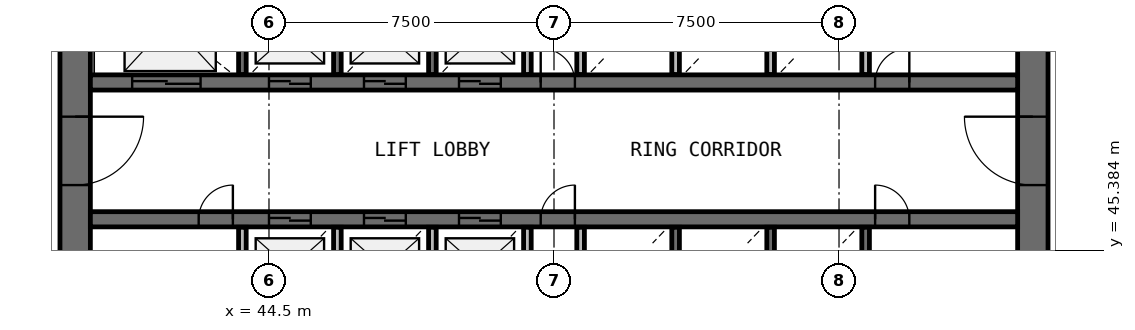
"""IFC4 building model, lengths in metres.
Left out: names, types, materials, properties, quantities, classifications, styles, units other than length and angle.
Written with IfcOpenShell. Run it as: python <this file> out.ifc"""

import sys

from ifc_helpers import new_model, si_unit, direction, frame, frame_2d, origin, place, context, subcontext, project, spatial, rectangle, extrude, source, transform, mapped, element, fill, save


model = new_model("IFC4")
c1 = context("Model", 3, precision=1e-05, world=origin(), true_north=direction((0.0, 1.0)))
c2 = subcontext(c1, "Body", "Model", "MODEL_VIEW")
j1 = project(units=[si_unit("LENGTHUNIT", "METRE"), si_unit("PLANEANGLEUNIT", "RADIAN")], contexts=[c1])
p1 = place(None, origin())
s1 = spatial("IfcSite", under=j1, at=p1, CompositionType="ELEMENT")
p2 = place(p1, origin())
s2 = spatial("IfcBuilding", under=s1, at=p2, CompositionType="ELEMENT")
p3 = place(p2, frame((0.0, 0.0, 100.3)))
s3 = spatial("IfcBuildingStorey", under=s2, at=p3, CompositionType="ELEMENT", Elevation=100.3)
p4 = place(p3, frame((64.6, 38.0, 0.0), z_axis=(0.0, 0.0, 1.0), x_axis=(0.0, 1.0, 0.0)))
e1 = element("IfcWall", 1, at=p4, inside=s3, PredefinedType="SHEAR", context=c2, shape_type="SweptSolid", body=[
    extrude(rectangle(XDim=20.0, YDim=0.8, at=frame_2d((10.0, 0.0))), origin(), (0.0, 0.0, 1.0), 4.1),
])
p5 = place(p4, frame((9.1, 0.0, 0.0)))
e2 = element("IfcOpeningElement", 2, at=p5, cuts=e1, PredefinedType="OPENING", context=c2, shape_type="SweptSolid", body=[
    extrude(rectangle(XDim=1.8, YDim=2.1, at=frame_2d((0.9, 1.05))), frame((0.0, 0.41, 0.0), z_axis=(0.0, -1.0, 0.0), x_axis=(1.0, 0.0, 0.0)), (0.0, 0.0, 1.0), 0.82),
])
p6 = place(p3, frame((39.4, 58.0, 0.0), z_axis=(0.0, 0.0, 1.0), x_axis=(0.0, -1.0, 0.0)))
e3 = element("IfcWall", 3, at=p6, inside=s3, PredefinedType="SHEAR", context=c2, shape_type="SweptSolid", body=[
    extrude(rectangle(XDim=20.0, YDim=0.8, at=frame_2d((10.0, 0.0))), origin(), (0.0, 0.0, 1.0), 4.1),
])
p7 = place(p6, frame((9.1, 0.0, 0.0)))
e4 = element("IfcOpeningElement", 4, at=p7, cuts=e3, PredefinedType="OPENING", context=c2, shape_type="SweptSolid", body=[
    extrude(rectangle(XDim=1.8, YDim=2.1, at=frame_2d((0.9, 1.05))), frame((0.0, 0.41, 0.0), z_axis=(0.0, -1.0, 0.0), x_axis=(1.0, 0.0, 0.0)), (0.0, 0.0, 1.0), 0.82),
])
p8 = place(p3, frame((39.8, 49.8, 0.0), z_axis=(0.0, 0.0, 1.0), x_axis=(1.0, 0.0, 0.0)))
e5 = element("IfcWall", 5, at=p8, inside=s3, PredefinedType="SHEAR", context=c2, shape_type="SweptSolid", body=[
    extrude(rectangle(XDim=24.4, YDim=0.4, at=frame_2d((12.2, 0.0))), origin(), (0.0, 0.0, 1.0), 4.1),
])
p9 = place(p8, frame((4.7, 0.0, 0.0)))
e6 = element("IfcOpeningElement", 6, at=p9, cuts=e5, PredefinedType="OPENING", context=c2, shape_type="SweptSolid", body=[
    extrude(rectangle(XDim=1.1, YDim=2.1, at=frame_2d((0.55, 1.05))), frame((0.0, 0.21, 0.0), z_axis=(0.0, -1.0, 0.0), x_axis=(1.0, 0.0, 0.0)), (0.0, 0.0, 1.0), 0.42),
])
p10 = place(p8, frame((7.2, 0.0, 0.0)))
e7 = element("IfcOpeningElement", 7, at=p10, cuts=e5, PredefinedType="OPENING", context=c2, shape_type="SweptSolid", body=[
    extrude(rectangle(XDim=1.1, YDim=2.1, at=frame_2d((0.55, 1.05))), frame((0.0, 0.21, 0.0), z_axis=(0.0, -1.0, 0.0), x_axis=(1.0, 0.0, 0.0)), (0.0, 0.0, 1.0), 0.42),
])
p11 = place(p8, frame((9.7, 0.0, 0.0)))
e8 = element("IfcOpeningElement", 8, at=p11, cuts=e5, PredefinedType="OPENING", context=c2, shape_type="SweptSolid", body=[
    extrude(rectangle(XDim=1.1, YDim=2.1, at=frame_2d((0.55, 1.05))), frame((0.0, 0.21, 0.0), z_axis=(0.0, -1.0, 0.0), x_axis=(1.0, 0.0, 0.0)), (0.0, 0.0, 1.0), 0.42),
])
p12 = place(p8, frame((1.1, 0.0, 0.0)))
e9 = element("IfcOpeningElement", 9, at=p12, cuts=e5, PredefinedType="OPENING", context=c2, shape_type="SweptSolid", body=[
    extrude(rectangle(XDim=1.8, YDim=2.4, at=frame_2d((0.9, 1.2))), frame((0.0, 0.21, 0.0), z_axis=(0.0, -1.0, 0.0), x_axis=(1.0, 0.0, 0.0)), (0.0, 0.0, 1.0), 0.42),
])
p13 = place(p8, frame((20.65, 0.0, 0.0)))
e10 = element("IfcOpeningElement", 10, at=p13, cuts=e5, PredefinedType="OPENING", context=c2, shape_type="SweptSolid", body=[
    extrude(rectangle(XDim=0.9, YDim=2.1, at=frame_2d((0.45, 1.05))), frame((0.0, 0.21, 0.0), z_axis=(0.0, -1.0, 0.0), x_axis=(1.0, 0.0, 0.0)), (0.0, 0.0, 1.0), 0.42),
])
p14 = place(p8, frame((11.85, 0.0, 0.0)))
e11 = element("IfcOpeningElement", 11, at=p14, cuts=e5, PredefinedType="OPENING", context=c2, shape_type="SweptSolid", body=[
    extrude(rectangle(XDim=0.9, YDim=2.1, at=frame_2d((0.45, 1.05))), frame((0.0, 0.21, 0.0), z_axis=(0.0, -1.0, 0.0), x_axis=(1.0, 0.0, 0.0)), (0.0, 0.0, 1.0), 0.42),
])
p15 = place(p3, frame((39.8, 46.2, 0.0), z_axis=(0.0, 0.0, 1.0), x_axis=(1.0, 0.0, 0.0)))
e12 = element("IfcWall", 12, at=p15, inside=s3, PredefinedType="SHEAR", context=c2, shape_type="SweptSolid", body=[
    extrude(rectangle(XDim=24.4, YDim=0.4, at=frame_2d((12.2, 0.0))), origin(), (0.0, 0.0, 1.0), 4.1),
])
p16 = place(p15, frame((4.7, 0.0, 0.0)))
e13 = element("IfcOpeningElement", 13, at=p16, cuts=e12, PredefinedType="OPENING", context=c2, shape_type="SweptSolid", body=[
    extrude(rectangle(XDim=1.1, YDim=2.1, at=frame_2d((0.55, 1.05))), frame((0.0, 0.21, 0.0), z_axis=(0.0, -1.0, 0.0), x_axis=(1.0, 0.0, 0.0)), (0.0, 0.0, 1.0), 0.42),
])
p17 = place(p15, frame((7.2, 0.0, 0.0)))
e14 = element("IfcOpeningElement", 14, at=p17, cuts=e12, PredefinedType="OPENING", context=c2, shape_type="SweptSolid", body=[
    extrude(rectangle(XDim=1.1, YDim=2.1, at=frame_2d((0.55, 1.05))), frame((0.0, 0.21, 0.0), z_axis=(0.0, -1.0, 0.0), x_axis=(1.0, 0.0, 0.0)), (0.0, 0.0, 1.0), 0.42),
])
p18 = place(p15, frame((9.7, 0.0, 0.0)))
e15 = element("IfcOpeningElement", 15, at=p18, cuts=e12, PredefinedType="OPENING", context=c2, shape_type="SweptSolid", body=[
    extrude(rectangle(XDim=1.1, YDim=2.1, at=frame_2d((0.55, 1.05))), frame((0.0, 0.21, 0.0), z_axis=(0.0, -1.0, 0.0), x_axis=(1.0, 0.0, 0.0)), (0.0, 0.0, 1.0), 0.42),
])
p19 = place(p15, frame((20.65, 0.0, 0.0)))
e16 = element("IfcOpeningElement", 16, at=p19, cuts=e12, PredefinedType="OPENING", context=c2, shape_type="SweptSolid", body=[
    extrude(rectangle(XDim=0.9, YDim=2.1, at=frame_2d((0.45, 1.05))), frame((0.0, 0.21, 0.0), z_axis=(0.0, -1.0, 0.0), x_axis=(1.0, 0.0, 0.0)), (0.0, 0.0, 1.0), 0.42),
])
p20 = place(p15, frame((2.85, 0.0, 0.0)))
e17 = element("IfcOpeningElement", 17, at=p20, cuts=e12, PredefinedType="OPENING", context=c2, shape_type="SweptSolid", body=[
    extrude(rectangle(XDim=0.9, YDim=2.1, at=frame_2d((0.45, 1.05))), frame((0.0, 0.21, 0.0), z_axis=(0.0, -1.0, 0.0), x_axis=(1.0, 0.0, 0.0)), (0.0, 0.0, 1.0), 0.42),
])
p21 = place(p15, frame((11.85, 0.0, 0.0)))
e18 = element("IfcOpeningElement", 18, at=p21, cuts=e12, PredefinedType="OPENING", context=c2, shape_type="SweptSolid", body=[
    extrude(rectangle(XDim=0.9, YDim=2.1, at=frame_2d((0.45, 1.05))), frame((0.0, 0.21, 0.0), z_axis=(0.0, -1.0, 0.0), x_axis=(1.0, 0.0, 0.0)), (0.0, 0.0, 1.0), 0.42),
])
for number, where, z_axis, x_axis in (
    (19, (43.8, 45.99, 0.0), (0.0, 0.0, 1.0), (0.0, -1.0, 0.0)),
    (20, (43.8, 52.37, 0.0), (0.0, 0.0, 1.0), (0.0, -1.0, 0.0)),
):
    element("IfcWall", number, at=place(p3, frame(where, z_axis=z_axis, x_axis=x_axis)), inside=s3, PredefinedType="SOLIDWALL", context=c2, shape_type="SweptSolid", body=[
        extrude(rectangle(XDim=2.36, YDim=0.2, at=frame_2d((1.18, 0.0))), origin(), (0.0, 0.0, 1.0), 3.7),
    ])
p22 = place(p3, frame((46.3, 43.6, 0.0), z_axis=(0.0, 0.0, 1.0), x_axis=(0.0, 1.0, 0.0)))
e21 = element("IfcWall", 21, at=p22, inside=s3, PredefinedType="SOLIDWALL", context=c2, shape_type="SweptSolid", body=[
    extrude(rectangle(XDim=2.39, YDim=0.2, at=frame_2d((1.195, 0.0))), origin(), (0.0, 0.0, 1.0), 3.7),
])
for number, where, z_axis, x_axis in (
    (22, (46.3, 50.01, 0.0), (0.0, 0.0, 1.0), (0.0, 1.0, 0.0)),
    (23, (48.8, 43.63, 0.0), (0.0, 0.0, 1.0), (0.0, 1.0, 0.0)),
    (24, (48.8, 50.01, 0.0), (0.0, 0.0, 1.0), (0.0, 1.0, 0.0)),
    (25, (51.3, 43.63, 0.0), (0.0, 0.0, 1.0), (0.0, 1.0, 0.0)),
):
    element("IfcWall", number, at=place(p3, frame(where, z_axis=z_axis, x_axis=x_axis)), inside=s3, PredefinedType="SOLIDWALL", context=c2, shape_type="SweptSolid", body=[
        extrude(rectangle(XDim=2.36, YDim=0.2, at=frame_2d((1.18, 0.0))), origin(), (0.0, 0.0, 1.0), 3.7),
    ])
for number, where, z_axis, x_axis in (
    (26, (51.3, 50.01, 0.0), (0.0, 0.0, 1.0), (0.0, 1.0, 0.0)),
    (27, (52.7, 45.99, 0.0), (0.0, 0.0, 1.0), (0.0, -1.0, 0.0)),
):
    element("IfcWall", number, at=place(p3, frame(where, z_axis=z_axis, x_axis=x_axis)), inside=s3, PredefinedType="SOLIDWALL", context=c2, shape_type="SweptSolid", body=[
        extrude(rectangle(XDim=2.39, YDim=0.2, at=frame_2d((1.195, 0.0))), origin(), (0.0, 0.0, 1.0), 3.7),
    ])
for number, where, z_axis, x_axis in (
    (28, (52.7, 52.37, 0.0), (0.0, 0.0, 1.0), (0.0, -1.0, 0.0)),
    (29, (55.2, 43.63, 0.0), (0.0, 0.0, 1.0), (0.0, 1.0, 0.0)),
    (30, (55.2, 50.01, 0.0), (0.0, 0.0, 1.0), (0.0, 1.0, 0.0)),
    (31, (57.7, 43.63, 0.0), (0.0, 0.0, 1.0), (0.0, 1.0, 0.0)),
):
    element("IfcWall", number, at=place(p3, frame(where, z_axis=z_axis, x_axis=x_axis)), inside=s3, PredefinedType="SOLIDWALL", context=c2, shape_type="SweptSolid", body=[
        extrude(rectangle(XDim=2.36, YDim=0.2, at=frame_2d((1.18, 0.0))), origin(), (0.0, 0.0, 1.0), 3.7),
    ])
p23 = place(p3, frame((57.7, 50.01, 0.0), z_axis=(0.0, 0.0, 1.0), x_axis=(0.0, 1.0, 0.0)))
e32 = element("IfcWall", 32, at=p23, inside=s3, PredefinedType="SOLIDWALL", context=c2, shape_type="SweptSolid", body=[
    extrude(rectangle(XDim=2.39, YDim=0.2, at=frame_2d((1.195, 0.0))), origin(), (0.0, 0.0, 1.0), 3.7),
])
for number, where, z_axis, x_axis in (
    (33, (60.2, 43.63, 0.0), (0.0, 0.0, 1.0), (0.0, 1.0, 0.0)),
    (34, (60.2, 50.01, 0.0), (0.0, 0.0, 1.0), (0.0, 1.0, 0.0)),
):
    element("IfcWall", number, at=place(p3, frame(where, z_axis=z_axis, x_axis=x_axis)), inside=s3, PredefinedType="SOLIDWALL", context=c2, shape_type="SweptSolid", body=[
        extrude(rectangle(XDim=2.36, YDim=0.2, at=frame_2d((1.18, 0.0))), origin(), (0.0, 0.0, 1.0), 3.7),
    ])
m1 = source(origin(), c2, "Body", "SweptSolid", [
    extrude(rectangle(XDim=1.8, YDim=2.1, at=frame_2d((0.9, 1.05))), frame((0.0, 0.025, 0.0), z_axis=(0.0, -1.0, 0.0), x_axis=(1.0, 0.0, 0.0)), (0.0, 0.0, 1.0), 0.05),
])
p24 = place(p7, origin())
e35 = element("IfcDoor", 35, at=p24, inside=s3, OperationType="SINGLE_SWING_LEFT", PredefinedType="DOOR", context=c2, shape_type="MappedRepresentation", body=[
    mapped(m1, transform((0.0, 0.0, 0.0), scale=1.0)),
])
fill(e4, e35)
p25 = place(p5, origin())
e36 = element("IfcDoor", 36, at=p25, inside=s3, OperationType="SINGLE_SWING_RIGHT", PredefinedType="DOOR", context=c2, shape_type="MappedRepresentation", body=[
    mapped(m1, transform((0.0, 0.0, 0.0), scale=1.0)),
])
fill(e2, e36)
m2 = source(origin(), c2, "Body", "SweptSolid", [
    extrude(rectangle(XDim=1.1, YDim=2.1, at=frame_2d((0.55, 1.05))), frame((0.0, 0.025, 0.0), z_axis=(0.0, -1.0, 0.0), x_axis=(1.0, 0.0, 0.0)), (0.0, 0.0, 1.0), 0.05),
])
p26 = place(p9, origin())
e37 = element("IfcDoor", 37, at=p26, inside=s3, OperationType="DOUBLE_DOOR_SLIDING", PredefinedType="USERDEFINED", context=c2, shape_type="MappedRepresentation", body=[
    mapped(m2, transform((0.0, 0.0, 0.0), scale=1.0)),
])
fill(e6, e37)
p27 = place(p10, origin())
e38 = element("IfcDoor", 38, at=p27, inside=s3, OperationType="DOUBLE_DOOR_SLIDING", PredefinedType="USERDEFINED", context=c2, shape_type="MappedRepresentation", body=[
    mapped(m2, transform((0.0, 0.0, 0.0), scale=1.0)),
])
fill(e7, e38)
p28 = place(p11, origin())
e39 = element("IfcDoor", 39, at=p28, inside=s3, OperationType="DOUBLE_DOOR_SLIDING", PredefinedType="USERDEFINED", context=c2, shape_type="MappedRepresentation", body=[
    mapped(m2, transform((0.0, 0.0, 0.0), scale=1.0)),
])
fill(e8, e39)
p29 = place(p16, origin())
e40 = element("IfcDoor", 40, at=p29, inside=s3, OperationType="DOUBLE_DOOR_SLIDING", PredefinedType="USERDEFINED", context=c2, shape_type="MappedRepresentation", body=[
    mapped(m2, transform((0.0, 0.0, 0.0), scale=1.0)),
])
fill(e13, e40)
p30 = place(p17, origin())
e41 = element("IfcDoor", 41, at=p30, inside=s3, OperationType="DOUBLE_DOOR_SLIDING", PredefinedType="USERDEFINED", context=c2, shape_type="MappedRepresentation", body=[
    mapped(m2, transform((0.0, 0.0, 0.0), scale=1.0)),
])
fill(e14, e41)
p31 = place(p18, origin())
e42 = element("IfcDoor", 42, at=p31, inside=s3, OperationType="DOUBLE_DOOR_SLIDING", PredefinedType="USERDEFINED", context=c2, shape_type="MappedRepresentation", body=[
    mapped(m2, transform((0.0, 0.0, 0.0), scale=1.0)),
])
fill(e15, e42)
m3 = source(origin(), c2, "Body", "SweptSolid", [
    extrude(rectangle(XDim=1.8, YDim=2.4, at=frame_2d((0.9, 1.2))), frame((0.0, 0.025, 0.0), z_axis=(0.0, -1.0, 0.0), x_axis=(1.0, 0.0, 0.0)), (0.0, 0.0, 1.0), 0.05),
])
p32 = place(p12, origin())
e43 = element("IfcDoor", 43, at=p32, inside=s3, OperationType="DOUBLE_DOOR_SLIDING", PredefinedType="USERDEFINED", context=c2, shape_type="MappedRepresentation", body=[
    mapped(m3, transform((0.0, 0.0, 0.0), scale=1.0)),
])
fill(e9, e43)
m4 = source(origin(), c2, "Body", "SweptSolid", [
    extrude(rectangle(XDim=0.9, YDim=2.1, at=frame_2d((0.45, 1.05))), frame((0.0, 0.025, 0.0), z_axis=(0.0, -1.0, 0.0), x_axis=(1.0, 0.0, 0.0)), (0.0, 0.0, 1.0), 0.05),
])
p33 = place(p19, origin())
e44 = element("IfcDoor", 44, at=p33, inside=s3, OperationType="SINGLE_SWING_LEFT", PredefinedType="DOOR", context=c2, shape_type="MappedRepresentation", body=[
    mapped(m4, transform((0.0, 0.0, 0.0), scale=1.0)),
])
fill(e16, e44)
p34 = place(p13, origin())
e45 = element("IfcDoor", 45, at=p34, inside=s3, OperationType="SINGLE_SWING_RIGHT", PredefinedType="DOOR", context=c2, shape_type="MappedRepresentation", body=[
    mapped(m4, transform((0.0, 0.0, 0.0), scale=1.0)),
])
fill(e10, e45)
p35 = place(p20, origin())
e46 = element("IfcDoor", 46, at=p35, inside=s3, OperationType="SINGLE_SWING_RIGHT", PredefinedType="DOOR", context=c2, shape_type="MappedRepresentation", body=[
    mapped(m4, transform((0.0, 0.0, 0.0), scale=1.0)),
])
fill(e17, e46)
p36 = place(p14, origin())
e47 = element("IfcDoor", 47, at=p36, inside=s3, OperationType="SINGLE_SWING_LEFT", PredefinedType="DOOR", context=c2, shape_type="MappedRepresentation", body=[
    mapped(m4, transform((0.0, 0.0, 0.0), scale=1.0)),
])
fill(e11, e47)
p37 = place(p21, origin())
e48 = element("IfcDoor", 48, at=p37, inside=s3, OperationType="SINGLE_SWING_RIGHT", PredefinedType="DOOR", context=c2, shape_type="MappedRepresentation", body=[
    mapped(m4, transform((0.0, 0.0, 0.0), scale=1.0)),
])
fill(e18, e48)
save(model, sys.argv[1])
